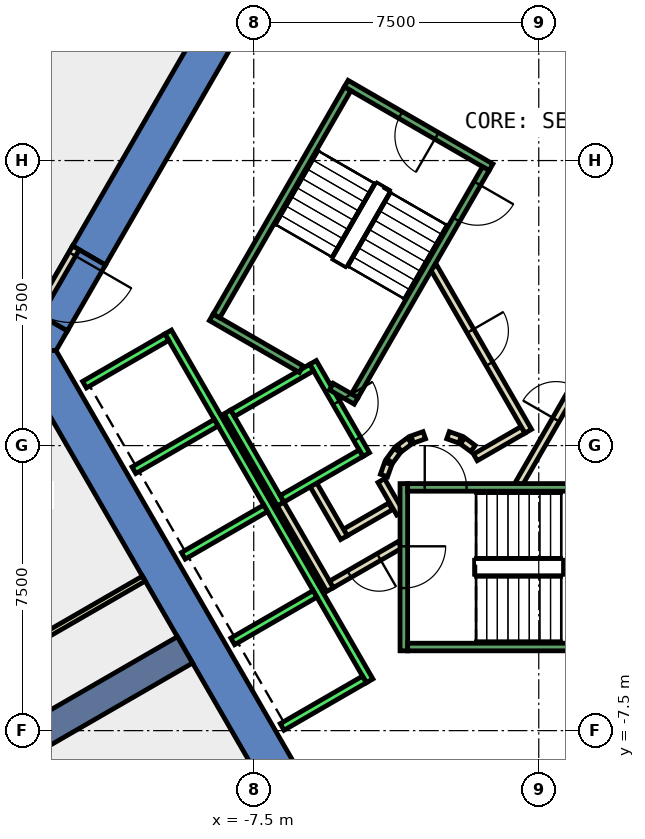
"""IFC4 building model, lengths in metres.
Left out: names, types, materials, properties, quantities, classifications, styles, units other than length and angle.
Written with IfcOpenShell. Run it as: python <this file> out.ifc"""

import sys

from ifc_helpers import new_model, si_unit, direction, frame, frame_2d, origin, place, context, subcontext, project, spatial, polyline, rectangle, outline, extrude, element, fill, save


model = new_model("IFC4")
c1 = context("Model", 3, precision=1e-05, world=origin(), true_north=direction((0.0, 1.0)))
c2 = subcontext(c1, "Body", "Model", "MODEL_VIEW")
j1 = project(units=[si_unit("LENGTHUNIT", "METRE"), si_unit("PLANEANGLEUNIT", "RADIAN")], contexts=[c1])
p1 = place(None, origin())
s1 = spatial("IfcSite", under=j1, at=p1, CompositionType="ELEMENT")
p2 = place(p1, origin())
s2 = spatial("IfcBuilding", under=s1, at=p2, CompositionType="ELEMENT")
p3 = place(p2, frame((0.0, 0.0, 9.0)))
s3 = spatial("IfcBuildingStorey", under=s2, at=p3, CompositionType="ELEMENT", Elevation=9.0)
p4 = place(p3, frame((0.0, 0.0, -0.45)))
e1 = element("IfcWall", 1, at=p4, inside=s3, PredefinedType="SHEAR", context=c2, shape_type="SweptSolid", body=[
    extrude(outline(polyline([(-12.267, 5.252), (-11.402, 4.752), (-6.351, 13.5), (-6.928, 14.5), (-12.267, 5.252)])), origin(), (0.0, 0.0, 1.0), 6.0),
])
p5 = place(p3, frame((0.0, 0.0, -0.45)))
e2 = element("IfcWall", 2, at=p5, inside=s3, PredefinedType="SHEAR", context=c2, shape_type="SweptSolid", body=[
    extrude(outline(polyline([(-12.402, 3.02), (-13.267, 3.52), (-13.856, 2.5), (-12.702, 2.5), (-12.402, 3.02)])), origin(), (0.0, 0.0, 1.0), 6.0),
])
p6 = place(p3, frame((0.0, 0.0, 3.6)))
e3 = element("IfcWall", 3, at=p6, inside=s3, PredefinedType="SHEAR", context=c2, shape_type="SweptSolid", body=[
    extrude(outline(polyline([(-13.267, 3.52), (-12.402, 3.02), (-11.402, 4.752), (-12.267, 5.252), (-13.267, 3.52)])), origin(), (0.0, 0.0, 1.0), 1.95),
])
p7 = place(p3, frame((0.0, 0.0, -0.45)))
e4 = element("IfcWall", 4, at=p7, inside=s3, PredefinedType="SHEAR", context=c2, shape_type="SweptSolid", body=[
    extrude(outline(polyline([(-13.856, 2.5), (-6.928, -9.5), (-6.351, -8.5), (-12.702, 2.5), (-13.856, 2.5)])), origin(), (0.0, 0.0, 1.0), 6.0),
])
p8 = place(p3, frame((-9.31, -5.375, -0.45), z_axis=(0.0, 0.0, 1.0), x_axis=(-0.866017533419, -0.500013631625, 0.0)))
e5 = element("IfcWall", 5, at=p8, inside=s3, PredefinedType="SHEAR", context=c2, shape_type="SweptSolid", body=[
    extrude(rectangle(XDim=9.0, YDim=0.8, at=frame_2d((4.5, 0.0))), origin(), (0.0, 0.0, 1.0), 6.0),
])
p9 = place(p3, frame((-3.9, -1.599, 0.0), z_axis=(0.0, 0.0, 1.0), x_axis=(-0.865969445389, -0.500096910261, 0.0)))
e6 = element("IfcWall", 6, at=p9, inside=s3, PredefinedType="PARTITIONING", context=c2, shape_type="SweptSolid", body=[
    extrude(rectangle(XDim=1.373, YDim=0.2, at=frame_2d((0.687, 0.0))), origin(), (0.0, 0.0, 1.0), 5.55),
])
p10 = place(p3, frame((-5.126, -2.422, 0.0), z_axis=(0.0, 0.0, 1.0), x_axis=(-0.500062241894, 0.865989465428, 0.0)))
e7 = element("IfcWall", 7, at=p10, inside=s3, PredefinedType="PARTITIONING", context=c2, shape_type="SweptSolid", body=[
    extrude(rectangle(XDim=1.7, YDim=0.2, at=frame_2d((0.85, 0.0))), origin(), (0.0, 0.0, 1.0), 5.55),
])
p11 = place(p3, frame((-5.492, -3.788, 0.0), z_axis=(0.0, 0.0, 1.0), x_axis=(-0.500008949224, 0.866020236886, 0.0)))
e8 = element("IfcWall", 8, at=p11, inside=s3, PredefinedType="PARTITIONING", context=c2, shape_type="SweptSolid", body=[
    extrude(rectangle(XDim=2.68, YDim=0.2, at=frame_2d((1.34, 0.0))), origin(), (0.0, 0.0, 1.0), 5.55),
])
p12 = place(p3, frame((-4.145, -0.92, 0.0), z_axis=(0.0, 0.0, 1.0), x_axis=(0.499743786207, -0.866173278362, 0.0)))
e9 = element("IfcWall", 9, at=p12, inside=s3, PredefinedType="PARTITIONING", context=c2, shape_type="SweptSolid", body=[
    extrude(rectangle(XDim=0.991, YDim=0.2, at=frame_2d((0.495, 0.0))), origin(), (0.0, 0.0, 1.0), 5.55),
])
p13 = place(p3, frame((-3.65, -2.61, 0.0), z_axis=(0.0, 0.0, 1.0), x_axis=(-0.866072462134, -0.499918483688, 0.0)))
e10 = element("IfcWall", 10, at=p13, inside=s3, PredefinedType="PARTITIONING", context=c2, shape_type="SweptSolid", body=[
    extrude(rectangle(XDim=2.084, YDim=0.2, at=frame_2d((1.042, 0.0))), origin(), (0.0, 0.0, 1.0), 5.55),
])
p14 = place(p13, frame((0.642, 0.0, 0.0)))
e11 = element("IfcOpeningElement", 11, at=p14, cuts=e10, PredefinedType="OPENING", context=c2, shape_type="SweptSolid", body=[
    extrude(rectangle(XDim=0.9, YDim=2.1, at=frame_2d((0.45, 1.05))), frame((0.0, 0.11, 0.0), z_axis=(0.0, -1.0, 0.0), x_axis=(1.0, 0.0, 0.0)), (0.0, 0.0, 1.0), 0.22),
])
p15 = place(p3, frame((-0.52, -1.0, 0.0), z_axis=(0.0, 0.0, 1.0), x_axis=(0.50011622646, 0.865958290007, 0.0)))
e12 = element("IfcWall", 12, at=p15, inside=s3, PredefinedType="PARTITIONING", context=c2, shape_type="SweptSolid", body=[
    extrude(rectangle(XDim=4.991, YDim=0.2, at=frame_2d((2.496, 0.0))), origin(), (0.0, 0.0, 1.0), 5.55),
])
p16 = place(p15, frame((1.945, 0.0, 0.0)))
e13 = element("IfcOpeningElement", 13, at=p16, cuts=e12, PredefinedType="OPENING", context=c2, shape_type="SweptSolid", body=[
    extrude(rectangle(XDim=1.0, YDim=2.1, at=frame_2d((0.5, 1.05))), frame((0.0, 0.11, 0.0), z_axis=(0.0, -1.0, 0.0), x_axis=(1.0, 0.0, 0.0)), (0.0, 0.0, 1.0), 0.22),
])
p17 = place(p3, frame((-0.412, 0.414, 0.0), z_axis=(0.0, 0.0, 1.0), x_axis=(-0.866017369001, -0.500013916395, 0.0)))
e14 = element("IfcWall", 14, at=p17, inside=s3, PredefinedType="PARTITIONING", context=c2, shape_type="SweptSolid", body=[
    extrude(rectangle(XDim=1.45, YDim=0.2, at=frame_2d((0.725, 0.0))), origin(), (0.0, 0.0, 1.0), 5.55),
])
p18 = place(p3, frame((-1.731, -0.077, 0.0), z_axis=(0.0, 0.0, 1.0), x_axis=(-0.804311165252, 0.594208338422, 0.0)))
e15 = element("IfcWall", 15, at=p18, inside=s3, PredefinedType="PARTITIONING", context=c2, shape_type="SweptSolid", body=[
    extrude(rectangle(XDim=0.338, YDim=0.2, at=frame_2d((0.169, 0.0))), origin(), (0.0, 0.0, 1.0), 5.55),
])
p19 = place(p3, frame((-2.07, 0.16, 0.0), z_axis=(0.0, 0.0, 1.0), x_axis=(-0.942199461132, 0.335052496547, 0.0)))
e16 = element("IfcWall", 16, at=p19, inside=s3, PredefinedType="PARTITIONING", context=c2, shape_type="SweptSolid", body=[
    extrude(rectangle(XDim=0.337, YDim=0.2, at=frame_2d((0.169, 0.0))), origin(), (0.0, 0.0, 1.0), 5.55),
])
p20 = place(p3, frame((-3.012, 0.273, 0.0), z_axis=(0.0, 0.0, 1.0), x_axis=(-0.942280615813, -0.334824194261, 0.0)))
e17 = element("IfcWall", 17, at=p20, inside=s3, PredefinedType="PARTITIONING", context=c2, shape_type="SweptSolid", body=[
    extrude(rectangle(XDim=0.338, YDim=0.2, at=frame_2d((0.169, 0.0))), origin(), (0.0, 0.0, 1.0), 5.55),
])
p21 = place(p3, frame((-3.397, 0.124, 0.0), z_axis=(0.0, 0.0, 1.0), x_axis=(-0.804311165252, -0.594208338422, 0.0)))
e18 = element("IfcWall", 18, at=p21, inside=s3, PredefinedType="PARTITIONING", context=c2, shape_type="SweptSolid", body=[
    extrude(rectangle(XDim=0.338, YDim=0.2, at=frame_2d((0.169, 0.0))), origin(), (0.0, 0.0, 1.0), 5.55),
])
p22 = place(p3, frame((-3.723, -0.131, 0.0), z_axis=(0.0, 0.0, 1.0), x_axis=(-0.594675113454, -0.803966112121, 0.0)))
e19 = element("IfcWall", 19, at=p22, inside=s3, PredefinedType="PARTITIONING", context=c2, shape_type="SweptSolid", body=[
    extrude(rectangle(XDim=0.338, YDim=0.2, at=frame_2d((0.169, 0.0))), origin(), (0.0, 0.0, 1.0), 5.55),
])
p23 = place(p3, frame((-3.96, -0.47, 0.0), z_axis=(0.0, 0.0, 1.0), x_axis=(-0.334824194261, -0.942280615813, 0.0)))
e20 = element("IfcWall", 20, at=p23, inside=s3, PredefinedType="PARTITIONING", context=c2, shape_type="SweptSolid", body=[
    extrude(rectangle(XDim=0.338, YDim=0.2, at=frame_2d((0.169, 0.0))), origin(), (0.0, 0.0, 1.0), 5.55),
])
p24 = place(p3, frame((-2.771, 4.7, 0.0), z_axis=(0.0, 0.0, 1.0), x_axis=(0.499969479948, -0.866043023828, 0.0)))
e21 = element("IfcWall", 21, at=p24, inside=s3, PredefinedType="PARTITIONING", context=c2, shape_type="SweptSolid", body=[
    extrude(rectangle(XDim=4.99, YDim=0.2, at=frame_2d((2.495, 0.0))), origin(), (0.0, 0.0, 1.0), 5.55),
])
p25 = place(p24, frame((1.945, 0.0, 0.0)))
e22 = element("IfcOpeningElement", 22, at=p25, cuts=e21, PredefinedType="OPENING", context=c2, shape_type="SweptSolid", body=[
    extrude(rectangle(XDim=1.0, YDim=2.1, at=frame_2d((0.5, 1.05))), frame((0.0, 0.11, 0.0), z_axis=(0.0, -1.0, 0.0), x_axis=(1.0, 0.0, 0.0)), (0.0, 0.0, 1.0), 0.22),
])
p26 = place(p3, frame((-10.392, -3.5, 0.0), z_axis=(0.0, 0.0, 1.0), x_axis=(-0.866033409894, -0.499986132754, 0.0)))
e23 = element("IfcWall", 23, at=p26, inside=s3, PredefinedType="PARTITIONING", context=c2, shape_type="SweptSolid", body=[
    extrude(rectangle(XDim=21.8, YDim=0.15, at=frame_2d((10.9, 0.0))), origin(), (0.0, 0.0, 1.0), 5.55),
])
p27 = place(p26, frame((10.08, 0.0, 0.0)))
e24 = element("IfcOpeningElement", 24, at=p27, cuts=e23, PredefinedType="OPENING", context=c2, shape_type="SweptSolid", body=[
    extrude(rectangle(XDim=1.8, YDim=2.1, at=frame_2d((0.9, 1.05))), frame((0.0, 0.085, 0.0), z_axis=(0.0, -1.0, 0.0), x_axis=(1.0, 0.0, 0.0)), (0.0, 0.0, 1.0), 0.17),
])
p28 = place(p3, frame((-12.18, 5.202, 0.0), z_axis=(0.0, 0.0, 1.0), x_axis=(-0.50002537861, -0.866010750942, 0.0)))
e25 = element("IfcWall", 25, at=p28, inside=s3, PredefinedType="PARTITIONING", context=c2, shape_type="SweptSolid", body=[
    extrude(rectangle(XDim=2.0, YDim=0.2, at=frame_2d((1.0, 0.0))), origin(), (0.0, 0.0, 1.0), 2.4),
])
p29 = place(p28, frame((0.19, 0.0, 0.0)))
e26 = element("IfcOpeningElement", 26, at=p29, cuts=e25, PredefinedType="OPENING", context=c2, shape_type="SweptSolid", body=[
    extrude(rectangle(XDim=1.8, YDim=2.1, at=frame_2d((0.9, 1.05))), frame((0.0, 0.11, 0.0), z_axis=(0.0, -1.0, 0.0), x_axis=(1.0, 0.0, 0.0)), (0.0, 0.0, 1.0), 0.22),
])
p30 = place(p3, frame((-5.94, 2.188, 0.0), z_axis=(0.0, 0.0, 1.0), x_axis=(0.49994636267, -0.866056369097, 0.0)))
e27 = element("IfcWall", 27, at=p30, inside=s3, PredefinedType="STANDARD", context=c2, shape_type="SweptSolid", body=[
    extrude(rectangle(XDim=2.8, YDim=0.2, at=frame_2d((1.4, 0.0))), origin(), (0.0, 0.0, 1.0), 5.55),
])
p31 = place(p30, frame((1.225, 0.0, 0.0)))
e28 = element("IfcOpeningElement", 28, at=p31, cuts=e27, PredefinedType="OPENING", context=c2, shape_type="SweptSolid", body=[
    extrude(rectangle(XDim=1.1, YDim=2.1, at=frame_2d((0.55, 1.05))), frame((0.0, 0.11, 0.0), z_axis=(0.0, -1.0, 0.0), x_axis=(1.0, 0.0, 0.0)), (0.0, 0.0, 1.0), 0.22),
])
p32 = place(p3, frame((-8.192, 0.888, 0.0), z_axis=(0.0, 0.0, 1.0), x_axis=(0.49994636267, -0.866056369097, 0.0)))
e29 = element("IfcWall", 29, at=p32, inside=s3, PredefinedType="STANDARD", context=c2, shape_type="SweptSolid", body=[
    extrude(rectangle(XDim=2.8, YDim=0.2, at=frame_2d((1.4, 0.0))), origin(), (0.0, 0.0, 1.0), 5.55),
])
for number, where, z_axis, x_axis in (
    (30, (-5.977, 2.052, 0.0), (0.0, 0.0, 1.0), (-0.866, -0.5, 0.0)),
    (31, (-4.677, -0.2, 0.0), (0.0, 0.0, 1.0), (-0.866, -0.5, 0.0)),
):
    element("IfcWall", number, at=place(p3, frame(where, z_axis=z_axis, x_axis=x_axis)), inside=s3, PredefinedType="STANDARD", context=c2, shape_type="SweptSolid", body=[
        extrude(rectangle(XDim=2.399, YDim=0.2, at=frame_2d((1.2, 0.0))), origin(), (0.0, 0.0, 1.0), 5.55),
    ])
p33 = place(p3, frame((-9.751, 2.99, 0.0), z_axis=(0.0, 0.0, 1.0), x_axis=(0.50000090737, -0.866024879913, 0.0)))
e32 = element("IfcWall", 32, at=p33, inside=s3, PredefinedType="STANDARD", context=c2, shape_type="SweptSolid", body=[
    extrude(rectangle(XDim=10.6, YDim=0.2, at=frame_2d((5.3, 0.0))), origin(), (0.0, 0.0, 1.0), 5.55),
])
p34 = place(p3, frame((-9.788, 2.853, 0.0), z_axis=(0.0, 0.0, 1.0), x_axis=(-0.865998541277, -0.500046524342, 0.0)))
e33 = element("IfcWall", 33, at=p34, inside=s3, PredefinedType="STANDARD", context=c2, shape_type="SweptSolid", body=[
    extrude(rectangle(XDim=2.5, YDim=0.2, at=frame_2d((1.25, 0.0))), origin(), (0.0, 0.0, 1.0), 5.55),
])
for number, where, z_axis, x_axis in (
    (34, (-8.488, 0.602, 0.0), (0.0, 0.0, 1.0), (-0.866, -0.5, 0.0)),
    (35, (-7.188, -1.65, 0.0), (0.0, 0.0, 1.0), (-0.866, -0.5, 0.0)),
    (36, (-5.888, -3.902, 0.0), (0.0, 0.0, 1.0), (-0.866, -0.5, 0.0)),
    (37, (-4.588, -6.153, 0.0), (0.0, 0.0, 1.0), (-0.866, -0.5, 0.0)),
):
    element("IfcWall", number, at=place(p3, frame(where, z_axis=z_axis, x_axis=x_axis)), inside=s3, PredefinedType="STANDARD", context=c2, shape_type="SweptSolid", body=[
        extrude(rectangle(XDim=2.5, YDim=0.2, at=frame_2d((1.25, 0.0))), origin(), (0.0, 0.0, 1.0), 5.55),
    ])
p35 = place(p3, frame((-3.55, -1.0, 0.0), z_axis=(0.0, 0.0, 1.0), x_axis=(0.0, -1.0, 0.0)))
e38 = element("IfcWall", 38, at=p35, inside=s3, PredefinedType="STANDARD", context=c2, shape_type="SweptSolid", body=[
    extrude(rectangle(XDim=4.4, YDim=0.2, at=frame_2d((2.2, 0.0))), origin(), (0.0, 0.0, 1.0), 5.55),
])
p36 = place(p35, frame((1.65, 0.0, 0.0)))
e39 = element("IfcOpeningElement", 39, at=p36, cuts=e38, PredefinedType="OPENING", context=c2, shape_type="SweptSolid", body=[
    extrude(rectangle(XDim=1.1, YDim=2.2, at=frame_2d((0.55, 1.1))), frame((0.0, 0.11, 0.0), z_axis=(0.0, -1.0, 0.0), x_axis=(1.0, 0.0, 0.0)), (0.0, 0.0, 1.0), 0.22),
])
p37 = place(p3, frame((-3.45, -1.1, 0.0), z_axis=(0.0, 0.0, 1.0), x_axis=(1.0, 0.0, 0.0)))
e40 = element("IfcWall", 40, at=p37, inside=s3, PredefinedType="STANDARD", context=c2, shape_type="SweptSolid", body=[
    extrude(rectangle(XDim=6.9, YDim=0.2, at=frame_2d((3.45, 0.0))), origin(), (0.0, 0.0, 1.0), 5.55),
])
p38 = place(p37, frame((0.45, 0.0, 0.0)))
e41 = element("IfcOpeningElement", 41, at=p38, cuts=e40, PredefinedType="OPENING", context=c2, shape_type="SweptSolid", body=[
    extrude(rectangle(XDim=1.1, YDim=2.2, at=frame_2d((0.55, 1.1))), frame((0.0, 0.11, 0.0), z_axis=(0.0, -1.0, 0.0), x_axis=(1.0, 0.0, 0.0)), (0.0, 0.0, 1.0), 0.22),
])
p39 = place(p3, frame((-3.45, -5.3, 0.0), z_axis=(0.0, 0.0, 1.0), x_axis=(1.0, 0.0, 0.0)))
e42 = element("IfcWall", 42, at=p39, inside=s3, PredefinedType="STANDARD", context=c2, shape_type="SweptSolid", body=[
    extrude(rectangle(XDim=6.9, YDim=0.2, at=frame_2d((3.45, 0.0))), origin(), (0.0, 0.0, 1.0), 5.55),
])
p40 = place(p3, frame((-1.256, 7.324, 0.0), z_axis=(0.0, 0.0, 1.0), x_axis=(-0.866046073146, 0.499964197906, 0.0)))
e43 = element("IfcWall", 43, at=p40, inside=s3, PredefinedType="STANDARD", context=c2, shape_type="SweptSolid", body=[
    extrude(rectangle(XDim=4.4, YDim=0.2, at=frame_2d((2.2, 0.0))), origin(), (0.0, 0.0, 1.0), 5.55),
])
p41 = place(p40, frame((1.65, 0.0, 0.0)))
e44 = element("IfcOpeningElement", 44, at=p41, cuts=e43, PredefinedType="OPENING", context=c2, shape_type="SweptSolid", body=[
    extrude(rectangle(XDim=1.1, YDim=2.2, at=frame_2d((0.55, 1.1))), frame((0.0, 0.11, 0.0), z_axis=(0.0, -1.0, 0.0), x_axis=(1.0, 0.0, 0.0)), (0.0, 0.0, 1.0), 0.22),
])
p42 = place(p3, frame((-6.25, 2.01, 0.0), z_axis=(0.0, 0.0, 1.0), x_axis=(-0.86611865017, 0.499838457731, 0.0)))
e45 = element("IfcWall", 45, at=p42, inside=s3, PredefinedType="STANDARD", context=c2, shape_type="SweptSolid", body=[
    extrude(rectangle(XDim=2.733, YDim=0.2, at=frame_2d((1.366, 0.0))), origin(), (0.0, 0.0, 1.0), 5.55),
])
p43 = place(p3, frame((-4.806, 1.176, 0.0), z_axis=(0.0, 0.0, 1.0), x_axis=(-0.866558586415, 0.499075361355, 0.0)))
e46 = element("IfcWall", 46, at=p43, inside=s3, PredefinedType="STANDARD", context=c2, shape_type="SweptSolid", body=[
    extrude(rectangle(XDim=0.751, YDim=0.2, at=frame_2d((0.376, 0.0))), origin(), (0.0, 0.0, 1.0), 5.55),
])
p44 = place(p3, frame((-1.393, 7.288, 0.0), z_axis=(0.0, 0.0, 1.0), x_axis=(-0.499963383562, -0.866046543262, 0.0)))
e47 = element("IfcWall", 47, at=p44, inside=s3, PredefinedType="STANDARD", context=c2, shape_type="SweptSolid", body=[
    extrude(rectangle(XDim=6.9, YDim=0.2, at=frame_2d((3.45, 0.0))), origin(), (0.0, 0.0, 1.0), 5.55),
])
p45 = place(p44, frame((0.45, 0.0, 0.0)))
e48 = element("IfcOpeningElement", 48, at=p45, cuts=e47, PredefinedType="OPENING", context=c2, shape_type="SweptSolid", body=[
    extrude(rectangle(XDim=1.1, YDim=2.2, at=frame_2d((0.55, 1.1))), frame((0.0, 0.11, 0.0), z_axis=(0.0, -1.0, 0.0), x_axis=(1.0, 0.0, 0.0)), (0.0, 0.0, 1.0), 0.22),
])
p46 = place(p3, frame((-5.03, 9.388, 0.0), z_axis=(0.0, 0.0, 1.0), x_axis=(-0.499978703459, -0.866037698999, 0.0)))
e49 = element("IfcWall", 49, at=p46, inside=s3, PredefinedType="STANDARD", context=c2, shape_type="SweptSolid", body=[
    extrude(rectangle(XDim=6.9, YDim=0.2, at=frame_2d((3.45, 0.0))), origin(), (0.0, 0.0, 1.0), 5.55),
])
p47 = place(p16, origin())
e50 = element("IfcDoor", 50, at=p47, inside=s3, OperationType="SINGLE_SWING_LEFT", PredefinedType="DOOR", context=c2, shape_type="SweptSolid", body=[
    extrude(rectangle(XDim=1.0, YDim=2.1, at=frame_2d((0.5, 1.05))), frame((0.0, 0.025, 0.0), z_axis=(0.0, -1.0, 0.0), x_axis=(1.0, 0.0, 0.0)), (0.0, 0.0, 1.0), 0.05),
])
fill(e13, e50)
p48 = place(p25, origin())
e51 = element("IfcDoor", 51, at=p48, inside=s3, OperationType="SINGLE_SWING_RIGHT", PredefinedType="DOOR", context=c2, shape_type="SweptSolid", body=[
    extrude(rectangle(XDim=1.0, YDim=2.1, at=frame_2d((0.5, 1.05))), frame((0.0, 0.025, 0.0), z_axis=(0.0, -1.0, 0.0), x_axis=(1.0, 0.0, 0.0)), (0.0, 0.0, 1.0), 0.05),
])
fill(e22, e51)
p49 = place(p14, origin())
e52 = element("IfcDoor", 52, at=p49, inside=s3, OperationType="SINGLE_SWING_LEFT", PredefinedType="DOOR", context=c2, shape_type="SweptSolid", body=[
    extrude(rectangle(XDim=0.9, YDim=2.1, at=frame_2d((0.45, 1.05))), frame((0.0, 0.025, 0.0), z_axis=(0.0, -1.0, 0.0), x_axis=(1.0, 0.0, 0.0)), (0.0, 0.0, 1.0), 0.05),
])
fill(e11, e52)
p50 = place(p29, origin())
e53 = element("IfcDoor", 53, at=p50, inside=s3, OperationType="DOUBLE_DOOR_SINGLE_SWING", PredefinedType="DOOR", context=c2, shape_type="SweptSolid", body=[
    extrude(rectangle(XDim=1.8, YDim=2.1, at=frame_2d((0.9, 1.05))), frame((0.0, 0.025, 0.0), z_axis=(0.0, -1.0, 0.0), x_axis=(1.0, 0.0, 0.0)), (0.0, 0.0, 1.0), 0.05),
])
fill(e26, e53)
p51 = place(p31, origin())
e54 = element("IfcDoor", 54, at=p51, inside=s3, OperationType="SLIDING_TO_LEFT", PredefinedType="DOOR", context=c2, shape_type="SweptSolid", body=[
    extrude(rectangle(XDim=1.1, YDim=2.1, at=frame_2d((0.55, 1.05))), frame((0.0, 0.025, 0.0), z_axis=(0.0, -1.0, 0.0), x_axis=(1.0, 0.0, 0.0)), (0.0, 0.0, 1.0), 0.05),
])
fill(e28, e54)
p52 = place(p38, origin())
e55 = element("IfcDoor", 55, at=p52, inside=s3, OperationType="SINGLE_SWING_LEFT", PredefinedType="DOOR", context=c2, shape_type="SweptSolid", body=[
    extrude(rectangle(XDim=1.1, YDim=2.2, at=frame_2d((0.55, 1.1))), frame((0.0, 0.025, 0.0), z_axis=(0.0, -1.0, 0.0), x_axis=(1.0, 0.0, 0.0)), (0.0, 0.0, 1.0), 0.05),
])
fill(e41, e55)
p53 = place(p36, origin())
e56 = element("IfcDoor", 56, at=p53, inside=s3, OperationType="SINGLE_SWING_LEFT", PredefinedType="DOOR", context=c2, shape_type="SweptSolid", body=[
    extrude(rectangle(XDim=1.1, YDim=2.2, at=frame_2d((0.55, 1.1))), frame((0.0, 0.025, 0.0), z_axis=(0.0, -1.0, 0.0), x_axis=(1.0, 0.0, 0.0)), (0.0, 0.0, 1.0), 0.05),
])
fill(e39, e56)
p54 = place(p45, origin())
e57 = element("IfcDoor", 57, at=p54, inside=s3, OperationType="SINGLE_SWING_LEFT", PredefinedType="DOOR", context=c2, shape_type="SweptSolid", body=[
    extrude(rectangle(XDim=1.1, YDim=2.2, at=frame_2d((0.55, 1.1))), frame((0.0, 0.025, 0.0), z_axis=(0.0, -1.0, 0.0), x_axis=(1.0, 0.0, 0.0)), (0.0, 0.0, 1.0), 0.05),
])
fill(e48, e57)
p55 = place(p41, origin())
e58 = element("IfcDoor", 58, at=p55, inside=s3, OperationType="SINGLE_SWING_LEFT", PredefinedType="DOOR", context=c2, shape_type="SweptSolid", body=[
    extrude(rectangle(XDim=1.1, YDim=2.2, at=frame_2d((0.55, 1.1))), frame((0.0, 0.025, 0.0), z_axis=(0.0, -1.0, 0.0), x_axis=(1.0, 0.0, 0.0)), (0.0, 0.0, 1.0), 0.05),
])
fill(e44, e58)
save(model, sys.argv[1])
